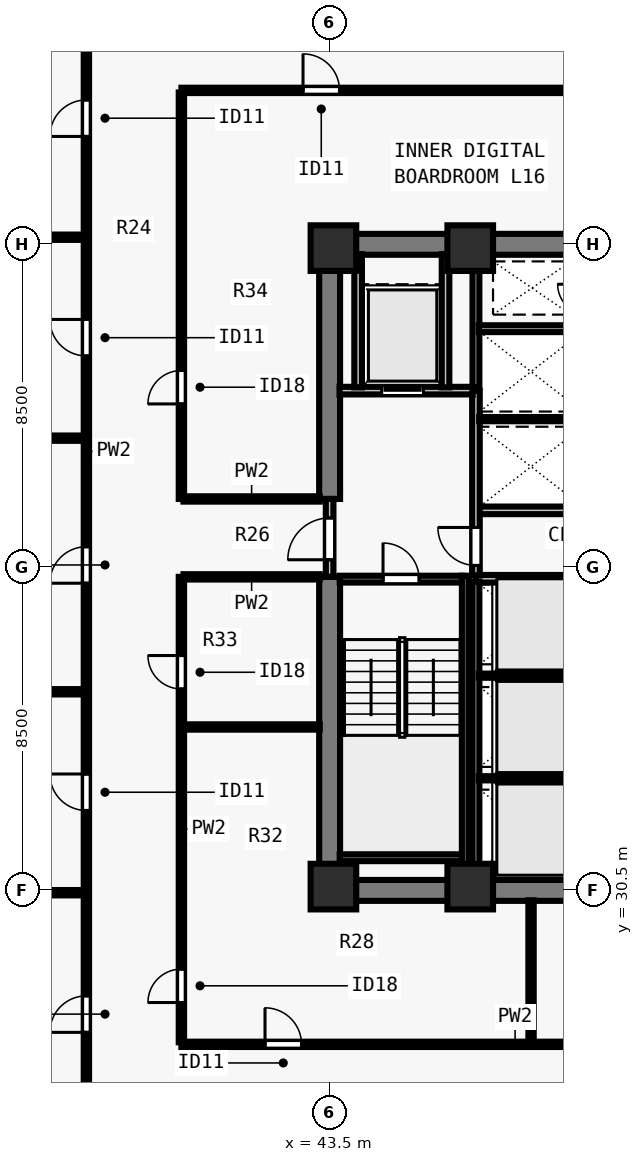
"""IFC4 building model, lengths in metres.
Left out: names, types, materials, properties, quantities, classifications, styles, units other than length and angle.
Written with IfcOpenShell. Run it as: python <this file> out.ifc"""

import sys

from ifc_helpers import new_model, si_unit, direction, frame, frame_2d, origin, origin_2d, place, context, subcontext, project, spatial, rectangle, extrude, element, fill, save


model = new_model("IFC4")
c1 = context("Model", 3, precision=1e-05, world=origin(), true_north=direction((0.0, 1.0)))
c2 = subcontext(c1, "Body", "Model", "MODEL_VIEW")
j1 = project(units=[si_unit("LENGTHUNIT", "METRE"), si_unit("PLANEANGLEUNIT", "RADIAN")], contexts=[c1])
p1 = place(None, origin())
s1 = spatial("IfcSite", under=j1, at=p1, CompositionType="ELEMENT")
p2 = place(p1, origin())
s2 = spatial("IfcBuilding", under=s1, at=p2, CompositionType="ELEMENT")
p3 = place(p2, frame((0.0, 0.0, 62.0)))
s3 = spatial("IfcBuildingStorey", under=s2, at=p3, CompositionType="ELEMENT", Elevation=62.0)
for number, where, z_axis, x_axis in (
    (1, (43.6, 30.6, 0.0), (0.0, 0.0, 1.0), (1.0, 0.0, 0.0)),
    (2, (47.2, 30.6, 0.0), (0.0, 0.0, 1.0), (1.0, 0.0, 0.0)),
    (3, (43.6, 47.4, 0.0), (0.0, 0.0, 1.0), (1.0, 0.0, 0.0)),
    (4, (47.2, 47.4, 0.0), (0.0, 0.0, 1.0), (1.0, 0.0, 0.0)),
):
    element("IfcColumn", number, at=place(p3, frame(where, z_axis=z_axis, x_axis=x_axis)), inside=s3, PredefinedType="COLUMN", context=c2, shape_type="SweptSolid", body=[
        extrude(rectangle(XDim=1.2, YDim=1.2, at=origin_2d()), origin(), (0.0, 0.0, 1.0), 3.5),
    ])
for number, where, z_axis, x_axis in (
    (5, (43.225, 30.5, 0.0), (0.0, 0.0, 1.0), (1.0, 0.0, 0.0)),
    (6, (43.225, 47.5, 0.0), (0.0, 0.0, 1.0), (1.0, 0.0, 0.0)),
):
    element("IfcWall", number, at=place(p3, frame(where, z_axis=z_axis, x_axis=x_axis)), inside=s3, PredefinedType="SHEAR", context=c2, shape_type="SweptSolid", body=[
        extrude(rectangle(XDim=17.55, YDim=0.55, at=frame_2d((8.775, 0.0))), origin(), (0.0, 0.0, 1.0), 3.28),
    ])
p4 = place(p3, frame((43.5, 30.765, 0.0), z_axis=(0.0, 0.0, 1.0), x_axis=(0.0, 1.0, 0.0)))
e7 = element("IfcWall", 7, at=p4, inside=s3, PredefinedType="SHEAR", context=c2, shape_type="SweptSolid", body=[
    extrude(rectangle(XDim=7.985, YDim=0.55, at=frame_2d((3.993, 0.0))), origin(), (0.0, 0.0, 1.0), 3.28),
])
p5 = place(p3, frame((43.5, 40.8, 0.0), z_axis=(0.0, 0.0, 1.0), x_axis=(0.0, 1.0, 0.0)))
e8 = element("IfcWall", 8, at=p5, inside=s3, PredefinedType="SHEAR", context=c2, shape_type="SweptSolid", body=[
    extrude(rectangle(XDim=6.435, YDim=0.55, at=frame_2d((3.218, 0.0))), origin(), (0.0, 0.0, 1.0), 3.28),
])
for number, where, z_axis, x_axis in (
    (9, (47.35, 38.7, 0.0), (0.0, 0.0, 1.0), (1.0, 0.0, 0.0)),
    (10, (47.35, 40.5, 0.0), (0.0, 0.0, 1.0), (1.0, 0.0, 0.0)),
):
    element("IfcWall", number, at=place(p3, frame(where, z_axis=z_axis, x_axis=x_axis)), inside=s3, PredefinedType="SOLIDWALL", context=c2, shape_type="SweptSolid", body=[
        extrude(rectangle(XDim=2.95, YDim=0.2, at=frame_2d((1.475, 0.0))), origin(), (0.0, 0.0, 1.0), 3.28),
    ])
p6 = place(p3, frame((43.5, 38.75, 0.0), z_axis=(0.0, 0.0, 1.0), x_axis=(0.0, 1.0, 0.0)))
e11 = element("IfcWall", 11, at=p6, inside=s3, PredefinedType="SOLIDWALL", context=c2, shape_type="SweptSolid", body=[
    extrude(rectangle(XDim=2.05, YDim=0.2, at=frame_2d((1.025, 0.0))), origin(), (0.0, 0.0, 1.0), 3.28),
])
p7 = place(p6, frame((0.45, 0.0, 0.0)))
e12 = element("IfcOpeningElement", 12, at=p7, cuts=e11, PredefinedType="OPENING", context=c2, shape_type="SweptSolid", body=[
    extrude(rectangle(XDim=1.1, YDim=2.15, at=frame_2d((0.55, 1.075))), frame((0.0, 0.11, 0.0), z_axis=(0.0, -1.0, 0.0), x_axis=(1.0, 0.0, 0.0)), (0.0, 0.0, 1.0), 0.22),
])
p8 = place(p3, frame((47.35, 38.785, 0.0), z_axis=(0.0, 0.0, 1.0), x_axis=(0.0, 1.0, 0.0)))
e13 = element("IfcWall", 13, at=p8, inside=s3, PredefinedType="SOLIDWALL", context=c2, shape_type="SweptSolid", body=[
    extrude(rectangle(XDim=4.865, YDim=0.2, at=frame_2d((2.433, 0.0))), origin(), (0.0, 0.0, 1.0), 3.28),
])
p9 = place(p8, frame((0.265, 0.0, 0.0)))
e14 = element("IfcOpeningElement", 14, at=p9, cuts=e13, PredefinedType="OPENING", context=c2, shape_type="SweptSolid", body=[
    extrude(rectangle(XDim=1.0, YDim=2.15, at=frame_2d((0.5, 1.075))), frame((0.0, 0.11, 0.0), z_axis=(0.0, -1.0, 0.0), x_axis=(1.0, 0.0, 0.0)), (0.0, 0.0, 1.0), 0.22),
])
p10 = place(p3, frame((43.76, 43.65, 0.0), z_axis=(0.0, 0.0, 1.0), x_axis=(1.0, 0.0, 0.0)))
e15 = element("IfcWall", 15, at=p10, inside=s3, PredefinedType="SOLIDWALL", context=c2, shape_type="SweptSolid", body=[
    extrude(rectangle(XDim=3.505, YDim=0.2, at=frame_2d((1.752, 0.0))), origin(), (0.0, 0.0, 1.0), 3.28),
])
p11 = place(p10, frame((1.11, 0.0, 0.0)))
e16 = element("IfcOpeningElement", 16, at=p11, cuts=e15, PredefinedType="OPENING", context=c2, shape_type="SweptSolid", body=[
    extrude(rectangle(XDim=1.1, YDim=2.2, at=frame_2d((0.55, 1.1))), frame((0.0, 0.11, 0.0), z_axis=(0.0, -1.0, 0.0), x_axis=(1.0, 0.0, 0.0)), (0.0, 0.0, 1.0), 0.22),
])
for number, where, z_axis, x_axis in (
    (17, (46.55, 43.735, 0.0), (0.0, 0.0, 1.0), (0.0, 1.0, 0.0)),
    (18, (44.25, 43.735, 0.0), (0.0, 0.0, 1.0), (0.0, 1.0, 0.0)),
):
    element("IfcWall", number, at=place(p3, frame(where, z_axis=z_axis, x_axis=x_axis)), inside=s3, PredefinedType="SOLIDWALL", context=c2, shape_type="SweptSolid", body=[
        extrude(rectangle(XDim=3.505, YDim=0.2, at=frame_2d((1.752, 0.0))), origin(), (0.0, 0.0, 1.0), 3.28),
    ])
p12 = place(p3, frame((47.35, 30.76, 0.0), z_axis=(0.0, 0.0, 1.0), x_axis=(0.0, 1.0, 0.0)))
e19 = element("IfcWall", 19, at=p12, inside=s3, PredefinedType="SOLIDWALL", context=c2, shape_type="SweptSolid", body=[
    extrude(rectangle(XDim=7.855, YDim=0.18, at=frame_2d((3.927, 0.0))), origin(), (0.0, 0.0, 1.0), 3.28),
])
for number, where, z_axis, x_axis in (
    (20, (47.425, 33.45, 0.0), (0.0, 0.0, 1.0), (1.0, 0.0, 0.0)),
    (21, (47.425, 36.15, 0.0), (0.0, 0.0, 1.0), (1.0, 0.0, 0.0)),
):
    element("IfcWall", number, at=place(p3, frame(where, z_axis=z_axis, x_axis=x_axis)), inside=s3, PredefinedType="PARTITIONING", context=c2, shape_type="SweptSolid", body=[
        extrude(rectangle(XDim=2.79, YDim=0.11, at=frame_2d((1.395, 0.0))), origin(), (0.0, 0.0, 1.0), 3.28),
    ])
p13 = place(p3, frame((47.35, 43.735, 0.0), z_axis=(0.0, 0.0, 1.0), x_axis=(0.0, 1.0, 0.0)))
e22 = element("IfcWall", 22, at=p13, inside=s3, PredefinedType="SOLIDWALL", context=c2, shape_type="SweptSolid", body=[
    extrude(rectangle(XDim=3.505, YDim=0.18, at=frame_2d((1.752, 0.0))), origin(), (0.0, 0.0, 1.0), 3.28),
])
p14 = place(p3, frame((47.435, 42.9, 0.0), z_axis=(0.0, 0.0, 1.0), x_axis=(1.0, 0.0, 0.0)))
e23 = element("IfcWall", 23, at=p14, inside=s3, PredefinedType="PARTITIONING", context=c2, shape_type="SweptSolid", body=[
    extrude(rectangle(XDim=2.78, YDim=0.11, at=frame_2d((1.39, 0.0))), origin(), (0.0, 0.0, 1.0), 3.28),
])
p15 = place(p3, frame((47.425, 45.28, 0.0), z_axis=(0.0, 0.0, 1.0), x_axis=(1.0, 0.0, 0.0)))
e24 = element("IfcWall", 24, at=p15, inside=s3, PredefinedType="SOLIDWALL", context=c2, shape_type="SweptSolid", body=[
    extrude(rectangle(XDim=2.79, YDim=0.18, at=frame_2d((1.395, 0.0))), origin(), (0.0, 0.0, 1.0), 3.28),
])
p16 = place(p3, frame((37.1, 24.005, 0.0), z_axis=(0.0, 0.0, 1.0), x_axis=(0.0, 1.0, 0.0)))
e25 = element("IfcWall", 25, at=p16, inside=s3, PredefinedType="PARTITIONING", context=c2, shape_type="SweptSolid", body=[
    extrude(rectangle(XDim=29.99, YDim=0.14, at=frame_2d((14.995, 0.0))), origin(), (0.0, 0.0, 1.0), 3.28),
])
p17 = place(p16, frame((2.76, 0.0, 0.0)))
e26 = element("IfcOpeningElement", 26, at=p17, cuts=e25, PredefinedType="OPENING", context=c2, shape_type="SweptSolid", body=[
    extrude(rectangle(XDim=0.96, YDim=2.12, at=frame_2d((0.48, 1.06))), frame((0.0, 0.08, 0.0), z_axis=(0.0, -1.0, 0.0), x_axis=(1.0, 0.0, 0.0)), (0.0, 0.0, 1.0), 0.16),
])
p18 = place(p16, frame((8.598, 0.0, 0.0)))
e27 = element("IfcOpeningElement", 27, at=p18, cuts=e25, PredefinedType="OPENING", context=c2, shape_type="SweptSolid", body=[
    extrude(rectangle(XDim=0.96, YDim=2.12, at=frame_2d((0.48, 1.06))), frame((0.0, 0.08, 0.0), z_axis=(0.0, -1.0, 0.0), x_axis=(1.0, 0.0, 0.0)), (0.0, 0.0, 1.0), 0.16),
])
p19 = place(p16, frame((14.578, 0.0, 0.0)))
e28 = element("IfcOpeningElement", 28, at=p19, cuts=e25, PredefinedType="OPENING", context=c2, shape_type="SweptSolid", body=[
    extrude(rectangle(XDim=0.96, YDim=2.12, at=frame_2d((0.48, 1.06))), frame((0.0, 0.08, 0.0), z_axis=(0.0, -1.0, 0.0), x_axis=(1.0, 0.0, 0.0)), (0.0, 0.0, 1.0), 0.16),
])
p20 = place(p16, frame((20.558, 0.0, 0.0)))
e29 = element("IfcOpeningElement", 29, at=p20, cuts=e25, PredefinedType="OPENING", context=c2, shape_type="SweptSolid", body=[
    extrude(rectangle(XDim=0.96, YDim=2.12, at=frame_2d((0.48, 1.06))), frame((0.0, 0.08, 0.0), z_axis=(0.0, -1.0, 0.0), x_axis=(1.0, 0.0, 0.0)), (0.0, 0.0, 1.0), 0.16),
])
p21 = place(p16, frame((26.333, 0.0, 0.0)))
e30 = element("IfcOpeningElement", 30, at=p21, cuts=e25, PredefinedType="OPENING", context=c2, shape_type="SweptSolid", body=[
    extrude(rectangle(XDim=0.96, YDim=2.12, at=frame_2d((0.48, 1.06))), frame((0.0, 0.08, 0.0), z_axis=(0.0, -1.0, 0.0), x_axis=(1.0, 0.0, 0.0)), (0.0, 0.0, 1.0), 0.16),
])
p22 = place(p3, frame((39.6, 26.45, 0.0), z_axis=(0.0, 0.0, 1.0), x_axis=(1.0, 0.0, 0.0)))
e31 = element("IfcWall", 31, at=p22, inside=s3, PredefinedType="PARTITIONING", context=c2, shape_type="SweptSolid", body=[
    extrude(rectangle(XDim=24.8, YDim=0.14, at=frame_2d((12.4, 0.0))), origin(), (0.0, 0.0, 1.0), 3.28),
])
p23 = place(p22, frame((2.2, 0.0, 0.0)))
e32 = element("IfcOpeningElement", 32, at=p23, cuts=e31, PredefinedType="OPENING", context=c2, shape_type="SweptSolid", body=[
    extrude(rectangle(XDim=0.96, YDim=2.12, at=frame_2d((0.48, 1.06))), frame((0.0, 0.08, 0.0), z_axis=(0.0, -1.0, 0.0), x_axis=(1.0, 0.0, 0.0)), (0.0, 0.0, 1.0), 0.16),
])
p24 = place(p22, frame((14.4, 0.0, 0.0)))
e33 = element("IfcOpeningElement", 33, at=p24, cuts=e31, PredefinedType="OPENING", context=c2, shape_type="SweptSolid", body=[
    extrude(rectangle(XDim=0.96, YDim=2.12, at=frame_2d((0.48, 1.06))), frame((0.0, 0.08, 0.0), z_axis=(0.0, -1.0, 0.0), x_axis=(1.0, 0.0, 0.0)), (0.0, 0.0, 1.0), 0.16),
])
p25 = place(p3, frame((39.6, 51.55, 0.0), z_axis=(0.0, 0.0, 1.0), x_axis=(1.0, 0.0, 0.0)))
e34 = element("IfcWall", 34, at=p25, inside=s3, PredefinedType="PARTITIONING", context=c2, shape_type="SweptSolid", body=[
    extrude(rectangle(XDim=24.8, YDim=0.14, at=frame_2d((12.4, 0.0))), origin(), (0.0, 0.0, 1.0), 3.28),
])
p26 = place(p25, frame((3.2, 0.0, 0.0)))
e35 = element("IfcOpeningElement", 35, at=p26, cuts=e34, PredefinedType="OPENING", context=c2, shape_type="SweptSolid", body=[
    extrude(rectangle(XDim=0.96, YDim=2.12, at=frame_2d((0.48, 1.06))), frame((0.0, 0.08, 0.0), z_axis=(0.0, -1.0, 0.0), x_axis=(1.0, 0.0, 0.0)), (0.0, 0.0, 1.0), 0.16),
])
p27 = place(p25, frame((18.4, 0.0, 0.0)))
e36 = element("IfcOpeningElement", 36, at=p27, cuts=e34, PredefinedType="OPENING", context=c2, shape_type="SweptSolid", body=[
    extrude(rectangle(XDim=0.96, YDim=2.12, at=frame_2d((0.48, 1.06))), frame((0.0, 0.08, 0.0), z_axis=(0.0, -1.0, 0.0), x_axis=(1.0, 0.0, 0.0)), (0.0, 0.0, 1.0), 0.16),
])
p28 = place(p3, frame((39.6, 26.505, 0.0), z_axis=(0.0, 0.0, 1.0), x_axis=(0.0, 1.0, 0.0)))
e37 = element("IfcWall", 37, at=p28, inside=s3, PredefinedType="PARTITIONING", context=c2, shape_type="SweptSolid", body=[
    extrude(rectangle(XDim=12.245, YDim=0.14, at=frame_2d((6.123, 0.0))), origin(), (0.0, 0.0, 1.0), 3.28),
])
p29 = place(p28, frame((1.045, 0.0, 0.0)))
e38 = element("IfcOpeningElement", 38, at=p29, cuts=e37, PredefinedType="OPENING", context=c2, shape_type="SweptSolid", body=[
    extrude(rectangle(XDim=0.88, YDim=2.1, at=frame_2d((0.44, 1.05))), frame((0.0, 0.08, 0.0), z_axis=(0.0, -1.0, 0.0), x_axis=(1.0, 0.0, 0.0)), (0.0, 0.0, 1.0), 0.16),
])
p30 = place(p28, frame((9.295, 0.0, 0.0)))
e39 = element("IfcOpeningElement", 39, at=p30, cuts=e37, PredefinedType="OPENING", context=c2, shape_type="SweptSolid", body=[
    extrude(rectangle(XDim=0.88, YDim=2.1, at=frame_2d((0.44, 1.05))), frame((0.0, 0.08, 0.0), z_axis=(0.0, -1.0, 0.0), x_axis=(1.0, 0.0, 0.0)), (0.0, 0.0, 1.0), 0.16),
])
p31 = place(p3, frame((39.6, 40.8, 0.0), z_axis=(0.0, 0.0, 1.0), x_axis=(0.0, 1.0, 0.0)))
e40 = element("IfcWall", 40, at=p31, inside=s3, PredefinedType="PARTITIONING", context=c2, shape_type="SweptSolid", body=[
    extrude(rectangle(XDim=10.695, YDim=0.14, at=frame_2d((5.348, 0.0))), origin(), (0.0, 0.0, 1.0), 3.28),
])
p32 = place(p31, frame((2.5, 0.0, 0.0)))
e41 = element("IfcOpeningElement", 41, at=p32, cuts=e40, PredefinedType="OPENING", context=c2, shape_type="SweptSolid", body=[
    extrude(rectangle(XDim=0.88, YDim=2.1, at=frame_2d((0.44, 1.05))), frame((0.0, 0.08, 0.0), z_axis=(0.0, -1.0, 0.0), x_axis=(1.0, 0.0, 0.0)), (0.0, 0.0, 1.0), 0.16),
])
for number, where, z_axis, x_axis in (
    (42, (39.655, 38.75, 0.0), (0.0, 0.0, 1.0), (1.0, 0.0, 0.0)),
    (43, (39.655, 40.8, 0.0), (0.0, 0.0, 1.0), (1.0, 0.0, 0.0)),
):
    element("IfcWall", number, at=place(p3, frame(where, z_axis=z_axis, x_axis=x_axis)), inside=s3, PredefinedType="PARTITIONING", context=c2, shape_type="SweptSolid", body=[
        extrude(rectangle(XDim=3.585, YDim=0.14, at=frame_2d((1.792, 0.0))), origin(), (0.0, 0.0, 1.0), 3.28),
    ])
p33 = place(p3, frame((48.8, 26.505, 0.0), z_axis=(0.0, 0.0, 1.0), x_axis=(0.0, 1.0, 0.0)))
e44 = element("IfcWall", 44, at=p33, inside=s3, PredefinedType="PARTITIONING", context=c2, shape_type="SweptSolid", body=[
    extrude(rectangle(XDim=3.735, YDim=0.14, at=frame_2d((1.868, 0.0))), origin(), (0.0, 0.0, 1.0), 3.28),
])
p34 = place(p3, frame((39.655, 34.8, 0.0), z_axis=(0.0, 0.0, 1.0), x_axis=(1.0, 0.0, 0.0)))
e45 = element("IfcWall", 45, at=p34, inside=s3, PredefinedType="PARTITIONING", context=c2, shape_type="SweptSolid", body=[
    extrude(rectangle(XDim=3.585, YDim=0.14, at=frame_2d((1.792, 0.0))), origin(), (0.0, 0.0, 1.0), 3.28),
])
p35 = place(p3, frame((26.92, 30.439, 0.0), z_axis=(0.0, 0.0, 1.0), x_axis=(1.0, 0.0, 0.0)))
e46 = element("IfcWall", 46, at=p35, inside=s3, PredefinedType="PARTITIONING", context=c2, shape_type="SweptSolid", body=[
    extrude(rectangle(XDim=10.08, YDim=0.14, at=frame_2d((5.04, 0.0))), origin(), (0.0, 0.0, 1.0), 3.28),
])
p36 = place(p3, frame((26.92, 35.727, 0.0), z_axis=(0.0, 0.0, 1.0), x_axis=(1.0, 0.0, 0.0)))
e47 = element("IfcWall", 47, at=p36, inside=s3, PredefinedType="PARTITIONING", context=c2, shape_type="SweptSolid", body=[
    extrude(rectangle(XDim=10.08, YDim=0.14, at=frame_2d((5.04, 0.0))), origin(), (0.0, 0.0, 1.0), 2.849),
])
for number, where, z_axis, x_axis in (
    (48, (26.92, 42.399, 0.0), (0.0, 0.0, 1.0), (1.0, 0.0, 0.0)),
    (49, (26.92, 47.687, 0.0), (0.0, 0.0, 1.0), (1.0, 0.0, 0.0)),
):
    element("IfcWall", number, at=place(p3, frame(where, z_axis=z_axis, x_axis=x_axis)), inside=s3, PredefinedType="PARTITIONING", context=c2, shape_type="SweptSolid", body=[
        extrude(rectangle(XDim=10.08, YDim=0.14, at=frame_2d((5.04, 0.0))), origin(), (0.0, 0.0, 1.0), 3.28),
    ])
p37 = place(p3, frame((43.765, 38.69, 0.0), z_axis=(0.0, 0.0, 1.0), x_axis=(1.0, 0.0, 0.0)))
e50 = element("IfcWall", 50, at=p37, inside=s3, PredefinedType="SOLIDWALL", context=c2, shape_type="SweptSolid", body=[
    extrude(rectangle(XDim=3.23, YDim=0.18, at=frame_2d((1.615, 0.0))), origin(), (0.0, 0.0, 1.0), 3.28),
])
p38 = place(p37, frame((1.14, 0.0, 0.0)))
e51 = element("IfcOpeningElement", 51, at=p38, cuts=e50, PredefinedType="OPENING", context=c2, shape_type="SweptSolid", body=[
    extrude(rectangle(XDim=0.95, YDim=2.15, at=frame_2d((0.475, 1.075))), frame((0.0, 0.1, 0.0), z_axis=(0.0, -1.0, 0.0), x_axis=(1.0, 0.0, 0.0)), (0.0, 0.0, 1.0), 0.2),
])
p39 = place(p3, frame((43.765, 31.36, 0.0), z_axis=(0.0, 0.0, 1.0), x_axis=(1.0, 0.0, 0.0)))
e52 = element("IfcWall", 52, at=p39, inside=s3, PredefinedType="SOLIDWALL", context=c2, shape_type="SweptSolid", body=[
    extrude(rectangle(XDim=3.23, YDim=0.18, at=frame_2d((1.615, 0.0))), origin(), (0.0, 0.0, 1.0), 3.28),
])
p40 = place(p3, frame((47.07, 38.78, 0.0), z_axis=(0.0, 0.0, 1.0), x_axis=(0.0, -1.0, 0.0)))
e53 = element("IfcWall", 53, at=p40, inside=s3, PredefinedType="SOLIDWALL", context=c2, shape_type="SweptSolid", body=[
    extrude(rectangle(XDim=8.017, YDim=0.18, at=frame_2d((4.009, 0.0))), origin(), (0.0, 0.0, 1.0), 3.28),
])
p41 = place(p7, origin())
e54 = element("IfcDoor", 54, at=p41, inside=s3, OperationType="SINGLE_SWING_LEFT", PredefinedType="DOOR", context=c2, shape_type="SweptSolid", body=[
    extrude(rectangle(XDim=1.1, YDim=2.15, at=frame_2d((0.55, 1.075))), frame((0.0, 0.025, 0.0), z_axis=(0.0, -1.0, 0.0), x_axis=(1.0, 0.0, 0.0)), (0.0, 0.0, 1.0), 0.05),
])
fill(e12, e54)
p42 = place(p9, origin())
e55 = element("IfcDoor", 55, at=p42, inside=s3, OperationType="SINGLE_SWING_RIGHT", PredefinedType="DOOR", context=c2, shape_type="SweptSolid", body=[
    extrude(rectangle(XDim=1.0, YDim=2.15, at=frame_2d((0.5, 1.075))), frame((0.0, 0.025, 0.0), z_axis=(0.0, -1.0, 0.0), x_axis=(1.0, 0.0, 0.0)), (0.0, 0.0, 1.0), 0.05),
])
fill(e14, e55)
p43 = place(p11, origin())
e56 = element("IfcDoor", 56, at=p43, inside=s3, OperationType="SLIDING_TO_LEFT", PredefinedType="DOOR", context=c2, shape_type="SweptSolid", body=[
    extrude(rectangle(XDim=1.1, YDim=2.2, at=frame_2d((0.55, 1.1))), frame((0.0, 0.025, 0.0), z_axis=(0.0, -1.0, 0.0), x_axis=(1.0, 0.0, 0.0)), (0.0, 0.0, 1.0), 0.05),
])
fill(e16, e56)
p44 = place(p23, origin())
e57 = element("IfcDoor", 57, at=p44, inside=s3, OperationType="SINGLE_SWING_LEFT", PredefinedType="DOOR", context=c2, shape_type="SweptSolid", body=[
    extrude(rectangle(XDim=0.96, YDim=2.12, at=frame_2d((0.48, 1.06))), frame((0.0, 0.025, 0.0), z_axis=(0.0, -1.0, 0.0), x_axis=(1.0, 0.0, 0.0)), (0.0, 0.0, 1.0), 0.05),
])
fill(e32, e57)
p45 = place(p26, origin())
e58 = element("IfcDoor", 58, at=p45, inside=s3, OperationType="SINGLE_SWING_LEFT", PredefinedType="DOOR", context=c2, shape_type="SweptSolid", body=[
    extrude(rectangle(XDim=0.96, YDim=2.12, at=frame_2d((0.48, 1.06))), frame((0.0, 0.025, 0.0), z_axis=(0.0, -1.0, 0.0), x_axis=(1.0, 0.0, 0.0)), (0.0, 0.0, 1.0), 0.05),
])
fill(e35, e58)
p46 = place(p29, origin())
e59 = element("IfcDoor", 59, at=p46, inside=s3, OperationType="SINGLE_SWING_LEFT", PredefinedType="DOOR", context=c2, shape_type="SweptSolid", body=[
    extrude(rectangle(XDim=0.88, YDim=2.1, at=frame_2d((0.44, 1.05))), frame((0.0, 0.025, 0.0), z_axis=(0.0, -1.0, 0.0), x_axis=(1.0, 0.0, 0.0)), (0.0, 0.0, 1.0), 0.05),
])
fill(e38, e59)
p47 = place(p30, origin())
e60 = element("IfcDoor", 60, at=p47, inside=s3, OperationType="SINGLE_SWING_RIGHT", PredefinedType="DOOR", context=c2, shape_type="SweptSolid", body=[
    extrude(rectangle(XDim=0.88, YDim=2.1, at=frame_2d((0.44, 1.05))), frame((0.0, 0.025, 0.0), z_axis=(0.0, -1.0, 0.0), x_axis=(1.0, 0.0, 0.0)), (0.0, 0.0, 1.0), 0.05),
])
fill(e39, e60)
p48 = place(p32, origin())
e61 = element("IfcDoor", 61, at=p48, inside=s3, OperationType="SINGLE_SWING_LEFT", PredefinedType="DOOR", context=c2, shape_type="SweptSolid", body=[
    extrude(rectangle(XDim=0.88, YDim=2.1, at=frame_2d((0.44, 1.05))), frame((0.0, 0.025, 0.0), z_axis=(0.0, -1.0, 0.0), x_axis=(1.0, 0.0, 0.0)), (0.0, 0.0, 1.0), 0.05),
])
fill(e41, e61)
p49 = place(p17, origin())
e62 = element("IfcDoor", 62, at=p49, inside=s3, OperationType="SINGLE_SWING_LEFT", PredefinedType="DOOR", context=c2, shape_type="SweptSolid", body=[
    extrude(rectangle(XDim=0.96, YDim=2.12, at=frame_2d((0.48, 1.06))), frame((0.0, 0.025, 0.0), z_axis=(0.0, -1.0, 0.0), x_axis=(1.0, 0.0, 0.0)), (0.0, 0.0, 1.0), 0.05),
])
fill(e26, e62)
p50 = place(p18, origin())
e63 = element("IfcDoor", 63, at=p50, inside=s3, OperationType="SINGLE_SWING_RIGHT", PredefinedType="DOOR", context=c2, shape_type="SweptSolid", body=[
    extrude(rectangle(XDim=0.96, YDim=2.12, at=frame_2d((0.48, 1.06))), frame((0.0, 0.025, 0.0), z_axis=(0.0, -1.0, 0.0), x_axis=(1.0, 0.0, 0.0)), (0.0, 0.0, 1.0), 0.05),
])
fill(e27, e63)
p51 = place(p19, origin())
e64 = element("IfcDoor", 64, at=p51, inside=s3, OperationType="SINGLE_SWING_LEFT", PredefinedType="DOOR", context=c2, shape_type="SweptSolid", body=[
    extrude(rectangle(XDim=0.96, YDim=2.12, at=frame_2d((0.48, 1.06))), frame((0.0, 0.025, 0.0), z_axis=(0.0, -1.0, 0.0), x_axis=(1.0, 0.0, 0.0)), (0.0, 0.0, 1.0), 0.05),
])
fill(e28, e64)
p52 = place(p20, origin())
e65 = element("IfcDoor", 65, at=p52, inside=s3, OperationType="SINGLE_SWING_RIGHT", PredefinedType="DOOR", context=c2, shape_type="SweptSolid", body=[
    extrude(rectangle(XDim=0.96, YDim=2.12, at=frame_2d((0.48, 1.06))), frame((0.0, 0.025, 0.0), z_axis=(0.0, -1.0, 0.0), x_axis=(1.0, 0.0, 0.0)), (0.0, 0.0, 1.0), 0.05),
])
fill(e29, e65)
p53 = place(p21, origin())
e66 = element("IfcDoor", 66, at=p53, inside=s3, OperationType="SINGLE_SWING_LEFT", PredefinedType="DOOR", context=c2, shape_type="SweptSolid", body=[
    extrude(rectangle(XDim=0.96, YDim=2.12, at=frame_2d((0.48, 1.06))), frame((0.0, 0.025, 0.0), z_axis=(0.0, -1.0, 0.0), x_axis=(1.0, 0.0, 0.0)), (0.0, 0.0, 1.0), 0.05),
])
fill(e30, e66)
p54 = place(p38, origin())
e67 = element("IfcDoor", 67, at=p54, inside=s3, OperationType="SINGLE_SWING_LEFT", PredefinedType="DOOR", context=c2, shape_type="SweptSolid", body=[
    extrude(rectangle(XDim=0.95, YDim=2.15, at=frame_2d((0.475, 1.075))), frame((0.0, 0.025, 0.0), z_axis=(0.0, -1.0, 0.0), x_axis=(1.0, 0.0, 0.0)), (0.0, 0.0, 1.0), 0.05),
])
fill(e51, e67)
save(model, sys.argv[1])
